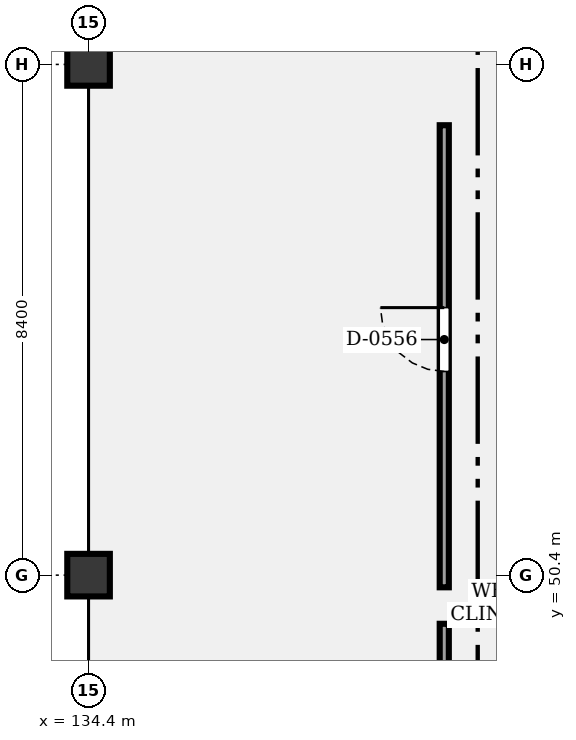
"""IFC4 building model, lengths in metres.
Left out: names, types, materials, properties, quantities, classifications, styles, units other than length and angle.
Written with IfcOpenShell. Run it as: python <this file> out.ifc"""

import sys

from ifc_helpers import new_model, si_unit, direction, frame, frame_2d, origin, origin_2d, place, context, subcontext, project, spatial, rectangle, extrude, element, fill, save


model = new_model("IFC4")
c1 = context("Model", 3, precision=1e-05, world=origin(), true_north=direction((0.0, 1.0)))
c2 = subcontext(c1, "Body", "Model", "MODEL_VIEW")
j1 = project(units=[si_unit("LENGTHUNIT", "METRE"), si_unit("PLANEANGLEUNIT", "RADIAN")], contexts=[c1])
p1 = place(None, origin())
s1 = spatial("IfcSite", under=j1, at=p1, CompositionType="ELEMENT")
p2 = place(p1, origin())
s2 = spatial("IfcBuilding", under=s1, at=p2, CompositionType="ELEMENT")
p3 = place(p2, frame((0.0, 0.0, 17.8)))
s3 = spatial("IfcBuildingStorey", under=s2, at=p3, CompositionType="ELEMENT", Elevation=17.8)
for number, where, z_axis, x_axis in (
    (1, (134.4, 50.4, 0.0), (0.0, 0.0, 1.0), (1.0, 0.0, 0.0)),
    (2, (134.4, 58.8, 0.0), (0.0, 0.0, 1.0), (1.0, 0.0, 0.0)),
):
    element("IfcColumn", number, at=place(p3, frame(where, z_axis=z_axis, x_axis=x_axis)), inside=s3, PredefinedType="COLUMN", context=c2, shape_type="SweptSolid", body=[
        extrude(rectangle(XDim=0.7, YDim=0.7, at=origin_2d()), origin(), (0.0, 0.0, 1.0), 4.2),
    ])
p4 = place(p3, frame((140.25, 42.0, 0.0), z_axis=(0.0, 0.0, 1.0), x_axis=(0.0, 1.0, 0.0)))
e3 = element("IfcWall", 3, at=p4, inside=s3, PredefinedType="PARTITIONING", context=c2, shape_type="SweptSolid", body=[
    extrude(rectangle(XDim=7.6, YDim=0.15, at=frame_2d((3.8, 0.0))), origin(), (0.0, 0.0, 1.0), 3.3),
])
p5 = place(p4, frame((3.55, 0.0, 0.0)))
e4 = element("IfcOpeningElement", 4, at=p5, cuts=e3, PredefinedType="OPENING", context=c2, shape_type="SweptSolid", body=[
    extrude(rectangle(XDim=1.05, YDim=2.1, at=frame_2d((0.525, 1.05))), frame((0.0, 0.085, 0.0), z_axis=(0.0, -1.0, 0.0), x_axis=(1.0, 0.0, 0.0)), (0.0, 0.0, 1.0), 0.17),
])
p6 = place(p3, frame((140.25, 50.2, 0.0), z_axis=(0.0, 0.0, 1.0), x_axis=(0.0, 1.0, 0.0)))
e5 = element("IfcWall", 5, at=p6, inside=s3, PredefinedType="PARTITIONING", context=c2, shape_type="SweptSolid", body=[
    extrude(rectangle(XDim=7.6, YDim=0.15, at=frame_2d((3.8, 0.0))), origin(), (0.0, 0.0, 1.0), 3.3),
])
p7 = place(p6, frame((3.55, 0.0, 0.0)))
e6 = element("IfcOpeningElement", 6, at=p7, cuts=e5, PredefinedType="OPENING", context=c2, shape_type="SweptSolid", body=[
    extrude(rectangle(XDim=1.05, YDim=2.1, at=frame_2d((0.525, 1.05))), frame((0.0, 0.085, 0.0), z_axis=(0.0, -1.0, 0.0), x_axis=(1.0, 0.0, 0.0)), (0.0, 0.0, 1.0), 0.17),
])
p8 = place(p7, origin())
e7 = element("IfcDoor", 7, at=p8, inside=s3, OperationType="SINGLE_SWING_RIGHT", PredefinedType="DOOR", context=c2, shape_type="SweptSolid", body=[
    extrude(rectangle(XDim=1.05, YDim=2.1, at=frame_2d((0.525, 1.05))), frame((0.0, 0.025, 0.0), z_axis=(0.0, -1.0, 0.0), x_axis=(1.0, 0.0, 0.0)), (0.0, 0.0, 1.0), 0.05),
])
fill(e6, e7)
save(model, sys.argv[1])
